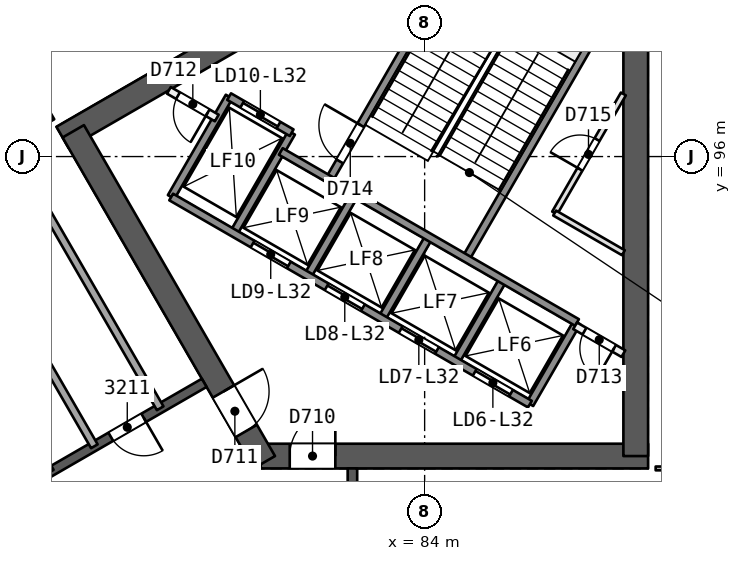
"""IFC4 building model, lengths in metres.
Left out: names, types, materials, properties, quantities, classifications, styles, units other than length and angle.
Written with IfcOpenShell. Run it as: python <this file> out.ifc"""

import sys

from ifc_helpers import new_model, si_unit, direction, frame, frame_2d, origin, place, context, subcontext, project, spatial, rectangle, extrude, element, fill, save


model = new_model("IFC4")
c1 = context("Model", 3, precision=1e-05, world=origin(), true_north=direction((0.0, 1.0)))
c2 = subcontext(c1, "Body", "Model", "MODEL_VIEW")
j1 = project(units=[si_unit("LENGTHUNIT", "METRE"), si_unit("PLANEANGLEUNIT", "RADIAN")], contexts=[c1])
p1 = place(None, origin())
s1 = spatial("IfcSite", under=j1, at=p1, CompositionType="ELEMENT")
p2 = place(p1, origin())
s2 = spatial("IfcBuilding", under=s1, at=p2, CompositionType="ELEMENT")
p3 = place(p2, frame((0.0, 0.0, 132.7)))
s3 = spatial("IfcBuildingStorey", under=s2, at=p3, CompositionType="ELEMENT", Elevation=132.7)
p4 = place(p3, frame((79.688, 88.119, 0.0), z_axis=(0.0, 0.0, 1.0), x_axis=(1.0, 0.0, 0.0)))
e1 = element("IfcWall", 1, at=p4, inside=s3, PredefinedType="SHEAR", context=c2, shape_type="SweptSolid", body=[
    extrude(rectangle(XDim=10.192, YDim=0.65, at=frame_2d((5.096, 0.0))), origin(), (0.0, 0.0, 1.0), 3.7),
])
p5 = place(p4, frame((0.762, 0.0, 0.0)))
e2 = element("IfcOpeningElement", 2, at=p5, cuts=e1, PredefinedType="OPENING", context=c2, shape_type="SweptSolid", body=[
    extrude(rectangle(XDim=1.2, YDim=2.1, at=frame_2d((0.6, 1.05))), frame((0.0, 0.335, 0.0), z_axis=(0.0, -1.0, 0.0), x_axis=(1.0, 0.0, 0.0)), (0.0, 0.0, 1.0), 0.671),
])
p6 = place(p3, frame((89.555, 88.119, 0.0), z_axis=(0.0, 0.0, 1.0), x_axis=(0.0, 1.0, 0.0)))
e3 = element("IfcWall", 3, at=p6, inside=s3, PredefinedType="SHEAR", context=c2, shape_type="SweptSolid", body=[
    extrude(rectangle(XDim=14.009, YDim=0.65, at=frame_2d((7.004, 0.0))), origin(), (0.0, 0.0, 1.0), 3.7),
])
p7 = place(p3, frame((86.723, 103.575, 0.0), z_axis=(0.0, 0.0, 1.0), x_axis=(-0.866031824457, -0.499988878904, 0.0)))
e4 = element("IfcWall", 4, at=p7, inside=s3, PredefinedType="SHEAR", context=c2, shape_type="SweptSolid", body=[
    extrude(rectangle(XDim=14.146, YDim=0.65, at=frame_2d((7.073, 0.0))), origin(), (0.0, 0.0, 1.0), 3.7),
])
p8 = place(p3, frame((74.754, 96.665, 0.0), z_axis=(0.0, 0.0, 1.0), x_axis=(0.500011799426, -0.866018591275, 0.0)))
e5 = element("IfcWall", 5, at=p8, inside=s3, PredefinedType="SHEAR", context=c2, shape_type="SweptSolid", body=[
    extrude(rectangle(XDim=10.055, YDim=0.65, at=frame_2d((5.027, 0.0))), origin(), (0.0, 0.0, 1.0), 3.7),
])
p9 = place(p8, frame((7.905, 0.0, 0.0)))
e6 = element("IfcOpeningElement", 6, at=p9, cuts=e5, PredefinedType="OPENING", context=c2, shape_type="SweptSolid", body=[
    extrude(rectangle(XDim=1.2, YDim=2.1, at=frame_2d((0.6, 1.05))), frame((0.0, 0.335, 0.0), z_axis=(0.0, -1.0, 0.0), x_axis=(1.0, 0.0, 0.0)), (0.0, 0.0, 1.0), 0.671),
])
p10 = place(p3, frame((82.1, 72.206, 0.0), z_axis=(0.0, 0.0, 1.0), x_axis=(0.0, 1.0, 0.0)))
e7 = element("IfcWall", 7, at=p10, inside=s3, PredefinedType="SHEAR", context=c2, shape_type="SweptSolid", body=[
    extrude(rectangle(XDim=15.588, YDim=0.25, at=frame_2d((7.794, 0.0))), origin(), (0.0, 0.0, 1.0), 3.25),
])
p11 = place(p10, frame((2.306, 0.0, 0.0)))
e8 = element("IfcOpeningElement", 8, at=p11, cuts=e7, PredefinedType="OPENING", context=c2, shape_type="SweptSolid", body=[
    extrude(rectangle(XDim=1.0, YDim=2.1, at=frame_2d((0.5, 1.05))), frame((0.0, 0.135, 0.0), z_axis=(0.0, -1.0, 0.0), x_axis=(1.0, 0.0, 0.0)), (0.0, 0.0, 1.0), 0.271),
])
p12 = place(p10, frame((8.415, 0.0, 0.0)))
e9 = element("IfcOpeningElement", 9, at=p12, cuts=e7, PredefinedType="OPENING", context=c2, shape_type="SweptSolid", body=[
    extrude(rectangle(XDim=1.0, YDim=2.1, at=frame_2d((0.5, 1.05))), frame((0.0, 0.135, 0.0), z_axis=(0.0, -1.0, 0.0), x_axis=(1.0, 0.0, 0.0)), (0.0, 0.0, 1.0), 0.271),
])
p13 = place(p10, frame((12.127, 0.0, 0.0)))
e10 = element("IfcOpeningElement", 10, at=p13, cuts=e7, PredefinedType="OPENING", context=c2, shape_type="SweptSolid", body=[
    extrude(rectangle(XDim=1.0, YDim=2.1, at=frame_2d((0.5, 1.05))), frame((0.0, 0.135, 0.0), z_axis=(0.0, -1.0, 0.0), x_axis=(1.0, 0.0, 0.0)), (0.0, 0.0, 1.0), 0.271),
])
p14 = place(p3, frame((78.2, 90.046, 0.0), z_axis=(0.0, 0.0, 1.0), x_axis=(-0.866026492143, -0.499998114903, 0.0)))
e11 = element("IfcWall", 11, at=p14, inside=s3, PredefinedType="SHEAR", context=c2, shape_type="SweptSolid", body=[
    extrude(rectangle(XDim=15.588, YDim=0.25, at=frame_2d((7.794, 0.0))), origin(), (0.0, 0.0, 1.0), 3.25),
])
p15 = place(p14, frame((1.838, 0.0, 0.0)))
e12 = element("IfcOpeningElement", 12, at=p15, cuts=e11, PredefinedType="OPENING", context=c2, shape_type="SweptSolid", body=[
    extrude(rectangle(XDim=1.0, YDim=2.1, at=frame_2d((0.5, 1.05))), frame((0.0, 0.135, 0.0), z_axis=(0.0, -1.0, 0.0), x_axis=(1.0, 0.0, 0.0)), (0.0, 0.0, 1.0), 0.271),
])
p16 = place(p14, frame((8.538, 0.0, 0.0)))
e13 = element("IfcOpeningElement", 13, at=p16, cuts=e11, PredefinedType="OPENING", context=c2, shape_type="SweptSolid", body=[
    extrude(rectangle(XDim=1.1, YDim=2.1, at=frame_2d((0.55, 1.05))), frame((0.0, 0.135, 0.0), z_axis=(0.0, -1.0, 0.0), x_axis=(1.0, 0.0, 0.0)), (0.0, 0.0, 1.0), 0.271),
])
p17 = place(p14, frame((12.594, 0.0, 0.0)))
e14 = element("IfcOpeningElement", 14, at=p17, cuts=e11, PredefinedType="OPENING", context=c2, shape_type="SweptSolid", body=[
    extrude(rectangle(XDim=1.0, YDim=2.1, at=frame_2d((0.5, 1.05))), frame((0.0, 0.135, 0.0), z_axis=(0.0, -1.0, 0.0), x_axis=(1.0, 0.0, 0.0)), (0.0, 0.0, 1.0), 0.271),
])
p18 = place(p3, frame((94.278, 87.794, 0.0), z_axis=(0.0, 0.0, 1.0), x_axis=(-1.0, 0.0, 0.0)))
e15 = element("IfcWall", 15, at=p18, inside=s3, PredefinedType="PARTITIONING", context=c2, shape_type="SweptSolid", body=[
    extrude(rectangle(XDim=4.198, YDim=0.1, at=frame_2d((2.099, 0.0))), origin(), (0.0, 0.0, 1.0), 3.25),
])
p19 = place(p18, frame((1.649, 0.0, 0.0)))
e16 = element("IfcOpeningElement", 16, at=p19, cuts=e15, PredefinedType="OPENING", context=c2, shape_type="SweptSolid", body=[
    extrude(rectangle(XDim=0.9, YDim=2.1, at=frame_2d((0.45, 1.05))), frame((0.0, 0.061, 0.0), z_axis=(0.0, -1.0, 0.0), x_axis=(1.0, 0.0, 0.0)), (0.0, 0.0, 1.0), 0.121),
])
p20 = place(p3, frame((74.21, 96.956, 0.0), z_axis=(0.0, 0.0, 1.0), x_axis=(-0.49999760543, 0.866026786286, 0.0)))
e17 = element("IfcWall", 17, at=p20, inside=s3, PredefinedType="PARTITIONING", context=c2, shape_type="SweptSolid", body=[
    extrude(rectangle(XDim=4.199, YDim=0.1, at=frame_2d((2.099, 0.0))), origin(), (0.0, 0.0, 1.0), 3.25),
])
p21 = place(p20, frame((1.649, 0.0, 0.0)))
e18 = element("IfcOpeningElement", 18, at=p21, cuts=e17, PredefinedType="OPENING", context=c2, shape_type="SweptSolid", body=[
    extrude(rectangle(XDim=0.9, YDim=2.1, at=frame_2d((0.45, 1.05))), frame((0.0, 0.061, 0.0), z_axis=(0.0, -1.0, 0.0), x_axis=(1.0, 0.0, 0.0)), (0.0, 0.0, 1.0), 0.121),
])
p22 = place(p3, frame((75.309, 88.377, 0.0), z_axis=(0.0, 0.0, 1.0), x_axis=(-0.5000018851, 0.866024315419, 0.0)))
e19 = element("IfcWall", 19, at=p22, inside=s3, PredefinedType="PARTITIONING", context=c2, shape_type="SweptSolid", body=[
    extrude(rectangle(XDim=9.0, YDim=0.2, at=frame_2d((4.5, 0.0))), origin(), (0.0, 0.0, 1.0), 3.25),
])
p23 = place(p22, frame((4.05, 0.0, 0.0)))
e20 = element("IfcOpeningElement", 20, at=p23, cuts=e19, PredefinedType="OPENING", context=c2, shape_type="SweptSolid", body=[
    extrude(rectangle(XDim=0.9, YDim=2.1, at=frame_2d((0.45, 1.05))), frame((0.0, 0.11, 0.0), z_axis=(0.0, -1.0, 0.0), x_axis=(1.0, 0.0, 0.0)), (0.0, 0.0, 1.0), 0.221),
])
p24 = place(p3, frame((72.541, 97.171, 0.0), z_axis=(0.0, 0.0, 1.0), x_axis=(0.5000018851, -0.866024315419, 0.0)))
e21 = element("IfcWall", 21, at=p24, inside=s3, PredefinedType="PARTITIONING", context=c2, shape_type="SweptSolid", body=[
    extrude(rectangle(XDim=9.0, YDim=0.2, at=frame_2d((4.5, 0.0))), origin(), (0.0, 0.0, 1.0), 3.25),
])
p25 = place(p3, frame((68.061, 98.254, 0.0), z_axis=(0.0, 0.0, 1.0), x_axis=(0.499987977232, -0.866032345022, 0.0)))
e22 = element("IfcWall", 22, at=p25, inside=s3, PredefinedType="PARTITIONING", context=c2, shape_type="SweptSolid", body=[
    extrude(rectangle(XDim=12.177, YDim=0.2, at=frame_2d((6.089, 0.0))), origin(), (0.0, 0.0, 1.0), 3.25),
])
p26 = place(p3, frame((41.097, 82.858, 0.0), z_axis=(0.0, 0.0, 1.0), x_axis=(0.866026276916, 0.499998487688, 0.0)))
e23 = element("IfcWall", 23, at=p26, inside=s3, PredefinedType="SOLIDWALL", context=c2, shape_type="SweptSolid", body=[
    extrude(rectangle(XDim=55.864, YDim=0.3, at=frame_2d((27.932, 0.0))), origin(), (0.0, 0.0, 1.0), 3.25),
])
p27 = place(p26, frame((26.888, 0.0, 0.0)))
e24 = element("IfcOpeningElement", 24, at=p27, cuts=e23, PredefinedType="OPENING", context=c2, shape_type="SweptSolid", body=[
    extrude(rectangle(XDim=2.4, YDim=2.4, at=frame_2d((1.2, 1.2))), frame((0.0, 0.161, 0.0), z_axis=(0.0, -1.0, 0.0), x_axis=(1.0, 0.0, 0.0)), (0.0, 0.0, 1.0), 0.321),
])
p28 = place(p26, frame((32.188, 0.0, 0.0)))
e25 = element("IfcOpeningElement", 25, at=p28, cuts=e23, PredefinedType="OPENING", context=c2, shape_type="SweptSolid", body=[
    extrude(rectangle(XDim=2.4, YDim=2.4, at=frame_2d((1.2, 1.2))), frame((0.0, 0.161, 0.0), z_axis=(0.0, -1.0, 0.0), x_axis=(1.0, 0.0, 0.0)), (0.0, 0.0, 1.0), 0.321),
])
p29 = place(p26, frame((43.384, 0.0, 0.0)))
e26 = element("IfcOpeningElement", 26, at=p29, cuts=e23, PredefinedType="OPENING", context=c2, shape_type="SweptSolid", body=[
    extrude(rectangle(XDim=2.4, YDim=2.4, at=frame_2d((1.2, 1.2))), frame((0.0, 0.161, 0.0), z_axis=(0.0, -1.0, 0.0), x_axis=(1.0, 0.0, 0.0)), (0.0, 0.0, 1.0), 0.321),
])
p30 = place(p26, frame((21.432, 0.0, 0.0)))
e27 = element("IfcOpeningElement", 27, at=p30, cuts=e23, PredefinedType="OPENING", context=c2, shape_type="SweptSolid", body=[
    extrude(rectangle(XDim=2.4, YDim=2.4, at=frame_2d((1.2, 1.2))), frame((0.0, 0.161, 0.0), z_axis=(0.0, -1.0, 0.0), x_axis=(1.0, 0.0, 0.0)), (0.0, 0.0, 1.0), 0.321),
])
p31 = place(p26, frame((10.029, 0.0, 0.0)))
e28 = element("IfcOpeningElement", 28, at=p31, cuts=e23, PredefinedType="OPENING", context=c2, shape_type="SweptSolid", body=[
    extrude(rectangle(XDim=2.4, YDim=2.4, at=frame_2d((1.2, 1.2))), frame((0.0, 0.161, 0.0), z_axis=(0.0, -1.0, 0.0), x_axis=(1.0, 0.0, 0.0)), (0.0, 0.0, 1.0), 0.321),
])
p32 = place(p3, frame((86.77, 89.486, 0.0), z_axis=(0.0, 0.0, 1.0), x_axis=(0.499961042966, 0.86604789447, 0.0)))
e29 = element("IfcWall", 29, at=p32, inside=s3, PredefinedType="SOLIDWALL", context=c2, shape_type="SweptSolid", body=[
    extrude(rectangle(XDim=2.48, YDim=0.2, at=frame_2d((1.24, 0.0))), origin(), (0.0, 0.0, 1.0), 3.25),
])
p33 = place(p3, frame((87.421, 94.514, 0.0), z_axis=(0.0, 0.0, 1.0), x_axis=(0.499993116331, 0.866029378036, 0.0)))
e30 = element("IfcWall", 30, at=p33, inside=s3, PredefinedType="PARTITIONING", context=c2, shape_type="SweptSolid", body=[
    extrude(rectangle(XDim=3.618, YDim=0.15, at=frame_2d((1.809, 0.0))), origin(), (0.0, 0.0, 1.0), 3.25),
])
p34 = place(p33, frame((1.332, 0.0, 0.0)))
e31 = element("IfcOpeningElement", 31, at=p34, cuts=e30, PredefinedType="OPENING", context=c2, shape_type="SweptSolid", body=[
    extrude(rectangle(XDim=0.9, YDim=2.1, at=frame_2d((0.45, 1.05))), frame((0.0, 0.085, 0.0), z_axis=(0.0, -1.0, 0.0), x_axis=(1.0, 0.0, 0.0)), (0.0, 0.0, 1.0), 0.171),
])
p35 = place(p3, frame((84.821, 90.611, 0.0), z_axis=(0.0, 0.0, 1.0), x_axis=(0.499961042966, 0.86604789447, 0.0)))
e32 = element("IfcWall", 32, at=p35, inside=s3, PredefinedType="SOLIDWALL", context=c2, shape_type="SweptSolid", body=[
    extrude(rectangle(XDim=2.48, YDim=0.2, at=frame_2d((1.24, 0.0))), origin(), (0.0, 0.0, 1.0), 3.25),
])
p36 = place(p3, frame((85.087, 93.321, 0.0), z_axis=(0.0, 0.0, 1.0), x_axis=(0.500019787375, 0.866013979237, 0.0)))
e33 = element("IfcWall", 33, at=p36, inside=s3, PredefinedType="SOLIDWALL", context=c2, shape_type="SweptSolid", body=[
    extrude(rectangle(XDim=7.7, YDim=0.2, at=frame_2d((3.85, 0.0))), origin(), (0.0, 0.0, 1.0), 3.25),
])
for number, where, z_axis, x_axis in (
    (34, (82.873, 91.736, 0.0), (0.0, 0.0, 1.0), (0.5, 0.866, 0.0)),
    (35, (80.924, 92.861, 0.0), (0.0, 0.0, 1.0), (0.5, 0.866, 0.0)),
):
    element("IfcWall", number, at=place(p3, frame(where, z_axis=z_axis, x_axis=x_axis)), inside=s3, PredefinedType="SOLIDWALL", context=c2, shape_type="SweptSolid", body=[
        extrude(rectangle(XDim=2.48, YDim=0.2, at=frame_2d((1.24, 0.0))), origin(), (0.0, 0.0, 1.0), 3.25),
    ])
p37 = place(p3, frame((81.493, 95.396, 0.0), z_axis=(0.0, 0.0, 1.0), x_axis=(0.500006057782, 0.866021906294, 0.0)))
e36 = element("IfcWall", 36, at=p37, inside=s3, PredefinedType="SOLIDWALL", context=c2, shape_type="SweptSolid", body=[
    extrude(rectangle(XDim=7.7, YDim=0.2, at=frame_2d((3.85, 0.0))), origin(), (0.0, 0.0, 1.0), 3.25),
])
p38 = place(p37, frame((0.55, 0.0, 0.0)))
e37 = element("IfcOpeningElement", 37, at=p38, cuts=e36, PredefinedType="OPENING", context=c2, shape_type="SweptSolid", body=[
    extrude(rectangle(XDim=1.1, YDim=2.1, at=frame_2d((0.55, 1.05))), frame((0.0, 0.11, 0.0), z_axis=(0.0, -1.0, 0.0), x_axis=(1.0, 0.0, 0.0)), (0.0, 0.0, 1.0), 0.221),
])
for number, where, z_axis, x_axis in (
    (38, (78.976, 93.986, 0.0), (0.0, 0.0, 1.0), (0.5, 0.866, 0.0)),
    (39, (77.33, 94.936, 0.0), (0.0, 0.0, 1.0), (0.5, 0.866, 0.0)),
):
    element("IfcWall", number, at=place(p3, frame(where, z_axis=z_axis, x_axis=x_axis)), inside=s3, PredefinedType="SOLIDWALL", context=c2, shape_type="SweptSolid", body=[
        extrude(rectangle(XDim=3.05, YDim=0.2, at=frame_2d((1.525, 0.0))), origin(), (0.0, 0.0, 1.0), 3.25),
    ])
p39 = place(p3, frame((86.77, 89.486, 0.0), z_axis=(0.0, 0.0, 1.0), x_axis=(-0.86601811187, 0.500012629753, 0.0)))
e40 = element("IfcWall", 40, at=p39, inside=s3, PredefinedType="SOLIDWALL", context=c2, shape_type="SweptSolid", body=[
    extrude(rectangle(XDim=10.9, YDim=0.2, at=frame_2d((5.45, 0.0))), origin(), (0.0, 0.0, 1.0), 3.25),
])
p40 = place(p39, frame((0.575, 0.0, 0.0)))
e41 = element("IfcOpeningElement", 41, at=p40, cuts=e40, PredefinedType="OPENING", context=c2, shape_type="SweptSolid", body=[
    extrude(rectangle(XDim=1.1, YDim=2.1, at=frame_2d((0.55, 1.05))), frame((0.0, 0.11, 0.0), z_axis=(0.0, -1.0, 0.0), x_axis=(1.0, 0.0, 0.0)), (0.0, 0.0, 1.0), 0.221),
])
p41 = place(p39, frame((2.825, 0.0, 0.0)))
e42 = element("IfcOpeningElement", 42, at=p41, cuts=e40, PredefinedType="OPENING", context=c2, shape_type="SweptSolid", body=[
    extrude(rectangle(XDim=1.1, YDim=2.1, at=frame_2d((0.55, 1.05))), frame((0.0, 0.11, 0.0), z_axis=(0.0, -1.0, 0.0), x_axis=(1.0, 0.0, 0.0)), (0.0, 0.0, 1.0), 0.221),
])
p42 = place(p39, frame((5.075, 0.0, 0.0)))
e43 = element("IfcOpeningElement", 43, at=p42, cuts=e40, PredefinedType="OPENING", context=c2, shape_type="SweptSolid", body=[
    extrude(rectangle(XDim=1.1, YDim=2.1, at=frame_2d((0.55, 1.05))), frame((0.0, 0.11, 0.0), z_axis=(0.0, -1.0, 0.0), x_axis=(1.0, 0.0, 0.0)), (0.0, 0.0, 1.0), 0.221),
])
p43 = place(p39, frame((7.325, 0.0, 0.0)))
e44 = element("IfcOpeningElement", 44, at=p43, cuts=e40, PredefinedType="OPENING", context=c2, shape_type="SweptSolid", body=[
    extrude(rectangle(XDim=1.1, YDim=2.1, at=frame_2d((0.55, 1.05))), frame((0.0, 0.11, 0.0), z_axis=(0.0, -1.0, 0.0), x_axis=(1.0, 0.0, 0.0)), (0.0, 0.0, 1.0), 0.221),
])
p44 = place(p3, frame((89.23, 90.814, 0.0), z_axis=(0.0, 0.0, 1.0), x_axis=(-0.866022048785, 0.500005810984, 0.0)))
e45 = element("IfcWall", 45, at=p44, inside=s3, PredefinedType="PARTITIONING", context=c2, shape_type="SweptSolid", body=[
    extrude(rectangle(XDim=1.467, YDim=0.2, at=frame_2d((0.733, 0.0))), origin(), (0.0, 0.0, 1.0), 3.25),
])
p45 = place(p44, frame((0.283, 0.0, 0.0)))
e46 = element("IfcOpeningElement", 46, at=p45, cuts=e45, PredefinedType="OPENING", context=c2, shape_type="SweptSolid", body=[
    extrude(rectangle(XDim=0.9, YDim=2.1, at=frame_2d((0.45, 1.05))), frame((0.0, 0.11, 0.0), z_axis=(0.0, -1.0, 0.0), x_axis=(1.0, 0.0, 0.0)), (0.0, 0.0, 1.0), 0.221),
])
p46 = place(p3, frame((78.53, 97.014, 0.0), z_axis=(0.0, 0.0, 1.0), x_axis=(-0.866045896294, 0.499964504253, 0.0)))
e47 = element("IfcWall", 47, at=p46, inside=s3, PredefinedType="PARTITIONING", context=c2, shape_type="SweptSolid", body=[
    extrude(rectangle(XDim=1.455, YDim=0.2, at=frame_2d((0.728, 0.0))), origin(), (0.0, 0.0, 1.0), 3.25),
])
p47 = place(p46, frame((0.278, 0.0, 0.0)))
e48 = element("IfcOpeningElement", 48, at=p47, cuts=e47, PredefinedType="OPENING", context=c2, shape_type="SweptSolid", body=[
    extrude(rectangle(XDim=0.9, YDim=2.1, at=frame_2d((0.45, 1.05))), frame((0.0, 0.11, 0.0), z_axis=(0.0, -1.0, 0.0), x_axis=(1.0, 0.0, 0.0)), (0.0, 0.0, 1.0), 0.221),
])
p48 = place(p3, frame((88.01, 91.634, 0.0), z_axis=(0.0, 0.0, 1.0), x_axis=(-0.866024315419, 0.5000018851, 0.0)))
e49 = element("IfcWall", 49, at=p48, inside=s3, PredefinedType="SOLIDWALL", context=c2, shape_type="SweptSolid", body=[
    extrude(rectangle(XDim=9.0, YDim=0.2, at=frame_2d((4.5, 0.0))), origin(), (0.0, 0.0, 1.0), 3.25),
])
p49 = place(p3, frame((80.5, 96.627, 0.0), z_axis=(0.0, 0.0, 1.0), x_axis=(-0.86601224135, 0.500022797313, 0.0)))
e50 = element("IfcWall", 50, at=p49, inside=s3, PredefinedType="SOLIDWALL", context=c2, shape_type="SweptSolid", body=[
    extrude(rectangle(XDim=1.9, YDim=0.2, at=frame_2d((0.95, 0.0))), origin(), (0.0, 0.0, 1.0), 3.25),
])
p50 = place(p49, frame((0.4, 0.0, 0.0)))
e51 = element("IfcOpeningElement", 51, at=p50, cuts=e50, PredefinedType="OPENING", context=c2, shape_type="SweptSolid", body=[
    extrude(rectangle(XDim=1.1, YDim=2.1, at=frame_2d((0.55, 1.05))), frame((0.0, 0.11, 0.0), z_axis=(0.0, -1.0, 0.0), x_axis=(1.0, 0.0, 0.0)), (0.0, 0.0, 1.0), 0.221),
])
p51 = place(p3, frame((89.23, 93.469, 0.0), z_axis=(0.0, 0.0, 1.0), x_axis=(-0.866004557827, 0.500036104519, 0.0)))
e52 = element("IfcWall", 52, at=p51, inside=s3, PredefinedType="PARTITIONING", context=c2, shape_type="SweptSolid", body=[
    extrude(rectangle(XDim=2.089, YDim=0.15, at=frame_2d((1.044, 0.0))), origin(), (0.0, 0.0, 1.0), 3.25),
])
p52 = place(p15, origin())
e53 = element("IfcDoor", 53, at=p52, inside=s3, OperationType="SINGLE_SWING_LEFT", PredefinedType="NOTDEFINED", context=c2, shape_type="SweptSolid", body=[
    extrude(rectangle(XDim=1.0, YDim=2.1, at=frame_2d((0.5, 1.05))), frame((0.0, 0.025, 0.0), z_axis=(0.0, -1.0, 0.0), x_axis=(1.0, 0.0, 0.0)), (0.0, 0.0, 1.0), 0.05),
])
fill(e12, e53)
p53 = place(p5, origin())
e54 = element("IfcDoor", 54, at=p53, inside=s3, OperationType="SINGLE_SWING_RIGHT", PredefinedType="NOTDEFINED", context=c2, shape_type="SweptSolid", body=[
    extrude(rectangle(XDim=1.2, YDim=2.1, at=frame_2d((0.6, 1.05))), frame((0.0, 0.025, 0.0), z_axis=(0.0, -1.0, 0.0), x_axis=(1.0, 0.0, 0.0)), (0.0, 0.0, 1.0), 0.05),
])
fill(e2, e54)
p54 = place(p9, origin())
e55 = element("IfcDoor", 55, at=p54, inside=s3, OperationType="SINGLE_SWING_LEFT", PredefinedType="NOTDEFINED", context=c2, shape_type="SweptSolid", body=[
    extrude(rectangle(XDim=1.2, YDim=2.1, at=frame_2d((0.6, 1.05))), frame((0.0, 0.025, 0.0), z_axis=(0.0, -1.0, 0.0), x_axis=(1.0, 0.0, 0.0)), (0.0, 0.0, 1.0), 0.05),
])
fill(e6, e55)
p55 = place(p40, origin())
e56 = element("IfcDoor", 56, at=p55, inside=s3, OperationType="SLIDING_TO_RIGHT", PredefinedType="NOTDEFINED", context=c2, shape_type="SweptSolid", body=[
    extrude(rectangle(XDim=1.1, YDim=2.1, at=frame_2d((0.55, 1.05))), frame((0.0, 0.025, 0.0), z_axis=(0.0, -1.0, 0.0), x_axis=(1.0, 0.0, 0.0)), (0.0, 0.0, 1.0), 0.05),
])
fill(e41, e56)
p56 = place(p41, origin())
e57 = element("IfcDoor", 57, at=p56, inside=s3, OperationType="SLIDING_TO_LEFT", PredefinedType="NOTDEFINED", context=c2, shape_type="SweptSolid", body=[
    extrude(rectangle(XDim=1.1, YDim=2.1, at=frame_2d((0.55, 1.05))), frame((0.0, 0.025, 0.0), z_axis=(0.0, -1.0, 0.0), x_axis=(1.0, 0.0, 0.0)), (0.0, 0.0, 1.0), 0.05),
])
fill(e42, e57)
p57 = place(p42, origin())
e58 = element("IfcDoor", 58, at=p57, inside=s3, OperationType="SLIDING_TO_RIGHT", PredefinedType="NOTDEFINED", context=c2, shape_type="SweptSolid", body=[
    extrude(rectangle(XDim=1.1, YDim=2.1, at=frame_2d((0.55, 1.05))), frame((0.0, 0.025, 0.0), z_axis=(0.0, -1.0, 0.0), x_axis=(1.0, 0.0, 0.0)), (0.0, 0.0, 1.0), 0.05),
])
fill(e43, e58)
p58 = place(p43, origin())
e59 = element("IfcDoor", 59, at=p58, inside=s3, OperationType="SLIDING_TO_LEFT", PredefinedType="NOTDEFINED", context=c2, shape_type="SweptSolid", body=[
    extrude(rectangle(XDim=1.1, YDim=2.1, at=frame_2d((0.55, 1.05))), frame((0.0, 0.025, 0.0), z_axis=(0.0, -1.0, 0.0), x_axis=(1.0, 0.0, 0.0)), (0.0, 0.0, 1.0), 0.05),
])
fill(e44, e59)
p59 = place(p50, origin())
e60 = element("IfcDoor", 60, at=p59, inside=s3, OperationType="SLIDING_TO_RIGHT", PredefinedType="NOTDEFINED", context=c2, shape_type="SweptSolid", body=[
    extrude(rectangle(XDim=1.1, YDim=2.1, at=frame_2d((0.55, 1.05))), frame((0.0, 0.025, 0.0), z_axis=(0.0, -1.0, 0.0), x_axis=(1.0, 0.0, 0.0)), (0.0, 0.0, 1.0), 0.05),
])
fill(e51, e60)
p60 = place(p47, origin())
e61 = element("IfcDoor", 61, at=p60, inside=s3, OperationType="SINGLE_SWING_LEFT", PredefinedType="NOTDEFINED", context=c2, shape_type="SweptSolid", body=[
    extrude(rectangle(XDim=0.9, YDim=2.1, at=frame_2d((0.45, 1.05))), frame((0.0, 0.025, 0.0), z_axis=(0.0, -1.0, 0.0), x_axis=(1.0, 0.0, 0.0)), (0.0, 0.0, 1.0), 0.05),
])
fill(e48, e61)
p61 = place(p45, origin())
e62 = element("IfcDoor", 62, at=p61, inside=s3, OperationType="SINGLE_SWING_LEFT", PredefinedType="NOTDEFINED", context=c2, shape_type="SweptSolid", body=[
    extrude(rectangle(XDim=0.9, YDim=2.1, at=frame_2d((0.45, 1.05))), frame((0.0, 0.025, 0.0), z_axis=(0.0, -1.0, 0.0), x_axis=(1.0, 0.0, 0.0)), (0.0, 0.0, 1.0), 0.05),
])
fill(e46, e62)
p62 = place(p38, origin())
e63 = element("IfcDoor", 63, at=p62, inside=s3, OperationType="SINGLE_SWING_RIGHT", PredefinedType="NOTDEFINED", context=c2, shape_type="SweptSolid", body=[
    extrude(rectangle(XDim=1.1, YDim=2.1, at=frame_2d((0.55, 1.05))), frame((0.0, 0.025, 0.0), z_axis=(0.0, -1.0, 0.0), x_axis=(1.0, 0.0, 0.0)), (0.0, 0.0, 1.0), 0.05),
])
fill(e37, e63)
p63 = place(p34, origin())
e64 = element("IfcDoor", 64, at=p63, inside=s3, OperationType="SINGLE_SWING_LEFT", PredefinedType="NOTDEFINED", context=c2, shape_type="SweptSolid", body=[
    extrude(rectangle(XDim=0.9, YDim=2.1, at=frame_2d((0.45, 1.05))), frame((0.0, 0.025, 0.0), z_axis=(0.0, -1.0, 0.0), x_axis=(1.0, 0.0, 0.0)), (0.0, 0.0, 1.0), 0.05),
])
fill(e31, e64)
save(model, sys.argv[1])
